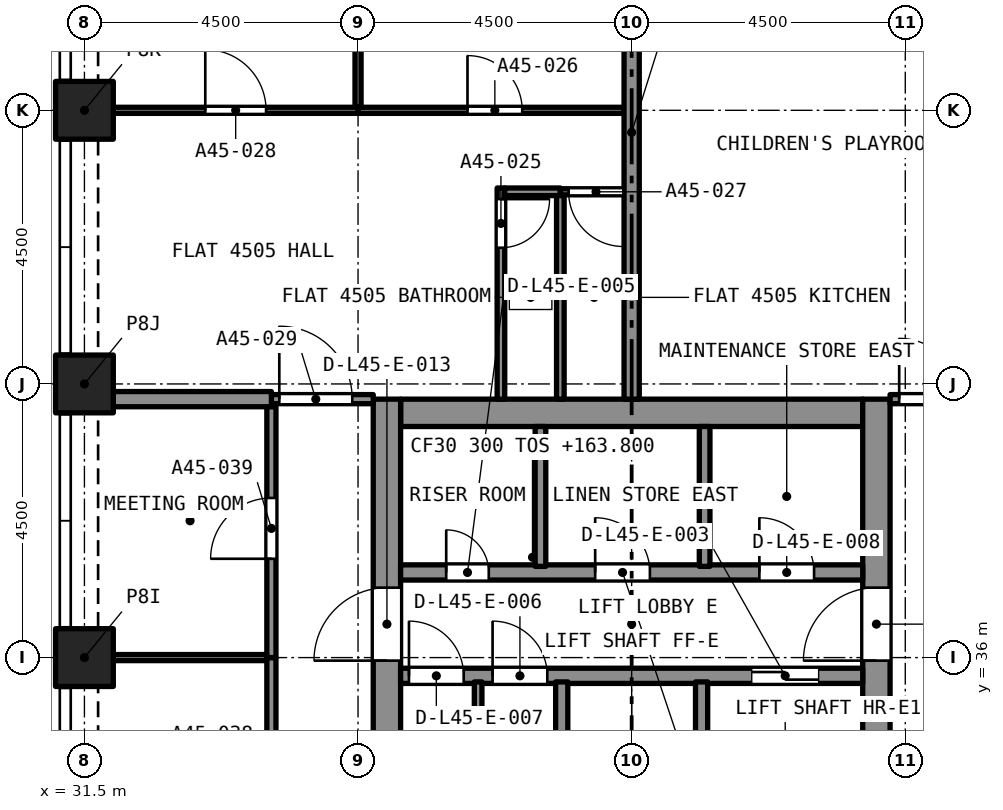
"""IFC4 building model, lengths in metres.
Left out: names, types, materials, properties, quantities, classifications, styles, units other than length and angle.
Written with IfcOpenShell. Run it as: python <this file> out.ifc"""

import sys

from ifc_helpers import new_model, si_unit, direction, frame, frame_2d, origin, origin_2d, place, context, subcontext, project, spatial, rectangle, extrude, element, fill, save


model = new_model("IFC4")
c1 = context("Model", 3, precision=1e-05, world=origin(), true_north=direction((0.0, 1.0)))
c2 = subcontext(c1, "Body", "Model", "MODEL_VIEW")
j1 = project(units=[si_unit("LENGTHUNIT", "METRE"), si_unit("PLANEANGLEUNIT", "RADIAN")], contexts=[c1])
p1 = place(None, origin())
s1 = spatial("IfcSite", under=j1, at=p1, CompositionType="ELEMENT")
p2 = place(p1, origin())
s2 = spatial("IfcBuilding", under=s1, at=p2, CompositionType="ELEMENT")
p3 = place(p2, frame((0.0, 0.0, 163.8)))
s3 = spatial("IfcBuildingStorey", under=s2, at=p3, CompositionType="ELEMENT", Elevation=163.8)
for number, where, z_axis, x_axis in (
    (1, (31.5, 36.0, 0.0), (0.0, 0.0, 1.0), (1.0, 0.0, 0.0)),
    (2, (31.5, 40.5, 0.0), (0.0, 0.0, 1.0), (1.0, 0.0, 0.0)),
    (3, (31.5, 45.0, 0.0), (0.0, 0.0, 1.0), (1.0, 0.0, 0.0)),
):
    element("IfcColumn", number, at=place(p3, frame(where, z_axis=z_axis, x_axis=x_axis)), inside=s3, PredefinedType="COLUMN", context=c2, shape_type="SweptSolid", body=[
        extrude(rectangle(XDim=0.95, YDim=0.95, at=origin_2d()), origin(), (0.0, 0.0, 1.0), 4.4),
    ])
p4 = place(p3, frame((36.7, 40.025, 0.0), z_axis=(0.0, 0.0, 1.0), x_axis=(1.0, 0.0, 0.0)))
e4 = element("IfcWall", 4, at=p4, inside=s3, PredefinedType="SOLIDWALL", context=c2, shape_type="SweptSolid", body=[
    extrude(rectangle(XDim=7.6, YDim=0.45, at=frame_2d((3.8, 0.0))), origin(), (0.0, 0.0, 1.0), 4.4),
])
p5 = place(p3, frame((36.475, 27.25, 0.0), z_axis=(0.0, 0.0, 1.0), x_axis=(0.0, 1.0, 0.0)))
e5 = element("IfcWall", 5, at=p5, inside=s3, PredefinedType="SOLIDWALL", context=c2, shape_type="SweptSolid", body=[
    extrude(rectangle(XDim=13.0, YDim=0.45, at=frame_2d((6.5, 0.0))), origin(), (0.0, 0.0, 1.0), 4.4),
])
p6 = place(p5, frame((8.7, 0.0, 0.0)))
e6 = element("IfcOpeningElement", 6, at=p6, cuts=e5, PredefinedType="OPENING", context=c2, shape_type="SweptSolid", body=[
    extrude(rectangle(XDim=1.2, YDim=2.1, at=frame_2d((0.6, 1.05))), frame((0.0, 0.235, 0.0), z_axis=(0.0, -1.0, 0.0), x_axis=(1.0, 0.0, 0.0)), (0.0, 0.0, 1.0), 0.47),
])
p7 = place(p3, frame((44.525, 27.25, 0.0), z_axis=(0.0, 0.0, 1.0), x_axis=(0.0, 1.0, 0.0)))
e7 = element("IfcWall", 7, at=p7, inside=s3, PredefinedType="SOLIDWALL", context=c2, shape_type="SweptSolid", body=[
    extrude(rectangle(XDim=13.0, YDim=0.45, at=frame_2d((6.5, 0.0))), origin(), (0.0, 0.0, 1.0), 4.4),
])
p8 = place(p7, frame((8.7, 0.0, 0.0)))
e8 = element("IfcOpeningElement", 8, at=p8, cuts=e7, PredefinedType="OPENING", context=c2, shape_type="SweptSolid", body=[
    extrude(rectangle(XDim=1.2, YDim=2.1, at=frame_2d((0.6, 1.05))), frame((0.0, 0.235, 0.0), z_axis=(0.0, -1.0, 0.0), x_axis=(1.0, 0.0, 0.0)), (0.0, 0.0, 1.0), 0.47),
])
p9 = place(p3, frame((38.35, 43.722, 0.0), z_axis=(0.0, 0.0, 1.0), x_axis=(0.0, -1.0, 0.0)))
e9 = element("IfcWall", 9, at=p9, inside=s3, PredefinedType="PARTITIONING", context=c2, shape_type="SweptSolid", body=[
    extrude(rectangle(XDim=3.472, YDim=0.125, at=frame_2d((1.736, 0.0))), origin(), (0.0, 0.0, 1.0), 4.1),
])
p10 = place(p9, frame((0.183, 0.0, 0.0)))
e10 = element("IfcOpeningElement", 10, at=p10, cuts=e9, PredefinedType="OPENING", context=c2, shape_type="SweptSolid", body=[
    extrude(rectangle(XDim=0.8, YDim=2.1, at=frame_2d((0.4, 1.05))), frame((0.0, 0.073, 0.0), z_axis=(0.0, -1.0, 0.0), x_axis=(1.0, 0.0, 0.0)), (0.0, 0.0, 1.0), 0.145),
])
p11 = place(p3, frame((38.413, 43.66, 0.0), z_axis=(0.0, 0.0, 1.0), x_axis=(1.0, 0.0, 0.0)))
e11 = element("IfcWall", 11, at=p11, inside=s3, PredefinedType="PARTITIONING", context=c2, shape_type="SweptSolid", body=[
    extrude(rectangle(XDim=0.915, YDim=0.125, at=frame_2d((0.458, 0.0))), origin(), (0.0, 0.0, 1.0), 4.1),
])
p12 = place(p3, frame((39.327, 40.25, 0.0), z_axis=(0.0, 0.0, 1.0), x_axis=(0.0, 1.0, 0.0)))
e12 = element("IfcWall", 12, at=p12, inside=s3, PredefinedType="PARTITIONING", context=c2, shape_type="SweptSolid", body=[
    extrude(rectangle(XDim=3.347, YDim=0.125, at=frame_2d((1.674, 0.0))), origin(), (0.0, 0.0, 1.0), 4.1),
])
p13 = place(p3, frame((36.0, 45.0, 0.0), z_axis=(0.0, 0.0, 1.0), x_axis=(1.0, 0.0, 0.0)))
e13 = element("IfcWall", 13, at=p13, inside=s3, PredefinedType="PARTITIONING", context=c2, shape_type="SweptSolid", body=[
    extrude(rectangle(XDim=4.375, YDim=0.1, at=frame_2d((2.188, 0.0))), origin(), (0.0, 0.0, 1.0), 4.1),
])
p14 = place(p13, frame((1.8, 0.0, 0.0)))
e14 = element("IfcOpeningElement", 14, at=p14, cuts=e13, PredefinedType="OPENING", context=c2, shape_type="SweptSolid", body=[
    extrude(rectangle(XDim=0.9, YDim=2.1, at=frame_2d((0.45, 1.05))), frame((0.0, 0.06, 0.0), z_axis=(0.0, -1.0, 0.0), x_axis=(1.0, 0.0, 0.0)), (0.0, 0.0, 1.0), 0.12),
])
p15 = place(p3, frame((36.0, 45.05, 0.0), z_axis=(0.0, 0.0, 1.0), x_axis=(0.0, 1.0, 0.0)))
e15 = element("IfcWall", 15, at=p15, inside=s3, PredefinedType="PARTITIONING", context=c2, shape_type="SweptSolid", body=[
    extrude(rectangle(XDim=3.975, YDim=0.1, at=frame_2d((1.987, 0.0))), origin(), (0.0, 0.0, 1.0), 4.1),
])
p16 = place(p3, frame((40.375, 43.66, 0.0), z_axis=(0.0, 0.0, 1.0), x_axis=(-1.0, 0.0, 0.0)))
e16 = element("IfcWall", 16, at=p16, inside=s3, PredefinedType="PARTITIONING", context=c2, shape_type="SweptSolid", body=[
    extrude(rectangle(XDim=1.048, YDim=0.1, at=frame_2d((0.524, 0.0))), origin(), (0.0, 0.0, 1.0), 4.1),
])
p17 = place(p16, frame((0.011, 0.0, 0.0)))
e17 = element("IfcOpeningElement", 17, at=p17, cuts=e16, PredefinedType="OPENING", context=c2, shape_type="SweptSolid", body=[
    extrude(rectangle(XDim=0.9, YDim=2.1, at=frame_2d((0.45, 1.05))), frame((0.0, 0.06, 0.0), z_axis=(0.0, -1.0, 0.0), x_axis=(1.0, 0.0, 0.0)), (0.0, 0.0, 1.0), 0.12),
])
p18 = place(p3, frame((31.975, 45.0, 0.0), z_axis=(0.0, 0.0, 1.0), x_axis=(1.0, 0.0, 0.0)))
e18 = element("IfcWall", 18, at=p18, inside=s3, PredefinedType="PARTITIONING", context=c2, shape_type="SweptSolid", body=[
    extrude(rectangle(XDim=4.025, YDim=0.1, at=frame_2d((2.012, 0.0))), origin(), (0.0, 0.0, 1.0), 4.1),
])
p19 = place(p18, frame((1.512, 0.0, 0.0)))
e19 = element("IfcOpeningElement", 19, at=p19, cuts=e18, PredefinedType="OPENING", context=c2, shape_type="SweptSolid", body=[
    extrude(rectangle(XDim=1.0, YDim=2.1, at=frame_2d((0.5, 1.05))), frame((0.0, 0.06, 0.0), z_axis=(0.0, -1.0, 0.0), x_axis=(1.0, 0.0, 0.0)), (0.0, 0.0, 1.0), 0.12),
])
p20 = place(p3, frame((34.575, 40.25, 0.0), z_axis=(0.0, 0.0, 1.0), x_axis=(1.0, 0.0, 0.0)))
e20 = element("IfcWall", 20, at=p20, inside=s3, PredefinedType="PARTITIONING", context=c2, shape_type="SweptSolid", body=[
    extrude(rectangle(XDim=1.675, YDim=0.15, at=frame_2d((0.837, 0.0))), origin(), (0.0, 0.0, 1.0), 4.1),
])
p21 = place(p20, frame((0.13, 0.0, 0.0)))
e21 = element("IfcOpeningElement", 21, at=p21, cuts=e20, PredefinedType="OPENING", context=c2, shape_type="SweptSolid", body=[
    extrude(rectangle(XDim=1.2, YDim=2.4, at=frame_2d((0.6, 1.2))), frame((0.0, 0.085, 0.0), z_axis=(0.0, -1.0, 0.0), x_axis=(1.0, 0.0, 0.0)), (0.0, 0.0, 1.0), 0.17),
])
p22 = place(p3, frame((31.975, 40.25, 0.0), z_axis=(0.0, 0.0, 1.0), x_axis=(1.0, 0.0, 0.0)))
e22 = element("IfcWall", 22, at=p22, inside=s3, PredefinedType="PARTITIONING", context=c2, shape_type="SweptSolid", body=[
    extrude(rectangle(XDim=2.6, YDim=0.25, at=frame_2d((1.3, 0.0))), origin(), (0.0, 0.0, 1.0), 4.1),
])
p23 = place(p3, frame((40.5, 40.25, 0.0), z_axis=(0.0, 0.0, 1.0), x_axis=(0.0, 1.0, 0.0)))
e23 = element("IfcWall", 23, at=p23, inside=s3, PredefinedType="PARTITIONING", context=c2, shape_type="SweptSolid", body=[
    extrude(rectangle(XDim=8.775, YDim=0.25, at=frame_2d((4.387, 0.0))), origin(), (0.0, 0.0, 1.0), 4.1),
])
p24 = place(p3, frame((44.75, 40.25, 0.0), z_axis=(0.0, 0.0, 1.0), x_axis=(1.0, 0.0, 0.0)))
e24 = element("IfcWall", 24, at=p24, inside=s3, PredefinedType="PARTITIONING", context=c2, shape_type="SweptSolid", body=[
    extrude(rectangle(XDim=1.2, YDim=0.15, at=frame_2d((0.6, 0.0))), origin(), (0.0, 0.0, 1.0), 4.1),
])
p25 = place(p24, frame((0.15, 0.0, 0.0)))
e25 = element("IfcOpeningElement", 25, at=p25, cuts=e24, PredefinedType="OPENING", context=c2, shape_type="SweptSolid", body=[
    extrude(rectangle(XDim=1.0, YDim=2.1, at=frame_2d((0.5, 1.05))), frame((0.0, 0.085, 0.0), z_axis=(0.0, -1.0, 0.0), x_axis=(1.0, 0.0, 0.0)), (0.0, 0.0, 1.0), 0.17),
])
p26 = place(p3, frame((34.575, 31.5, 0.0), z_axis=(0.0, 0.0, 1.0), x_axis=(0.0, 1.0, 0.0)))
e26 = element("IfcWall", 26, at=p26, inside=s3, PredefinedType="PARTITIONING", context=c2, shape_type="SweptSolid", body=[
    extrude(rectangle(XDim=4.5, YDim=0.15, at=frame_2d((2.25, 0.0))), origin(), (0.0, 0.0, 1.0), 4.1),
])
p27 = place(p26, frame((1.75, 0.0, 0.0)))
e27 = element("IfcOpeningElement", 27, at=p27, cuts=e26, PredefinedType="OPENING", context=c2, shape_type="SweptSolid", body=[
    extrude(rectangle(XDim=1.0, YDim=2.1, at=frame_2d((0.5, 1.05))), frame((0.0, 0.085, 0.0), z_axis=(0.0, -1.0, 0.0), x_axis=(1.0, 0.0, 0.0)), (0.0, 0.0, 1.0), 0.17),
])
p28 = place(p3, frame((34.575, 36.0, 0.0), z_axis=(0.0, 0.0, 1.0), x_axis=(0.0, 1.0, 0.0)))
e28 = element("IfcWall", 28, at=p28, inside=s3, PredefinedType="PARTITIONING", context=c2, shape_type="SweptSolid", body=[
    extrude(rectangle(XDim=4.125, YDim=0.15, at=frame_2d((2.062, 0.0))), origin(), (0.0, 0.0, 1.0), 4.1),
])
p29 = place(p28, frame((1.625, 0.0, 0.0)))
e29 = element("IfcOpeningElement", 29, at=p29, cuts=e28, PredefinedType="OPENING", context=c2, shape_type="SweptSolid", body=[
    extrude(rectangle(XDim=1.0, YDim=2.1, at=frame_2d((0.5, 1.05))), frame((0.0, 0.085, 0.0), z_axis=(0.0, -1.0, 0.0), x_axis=(1.0, 0.0, 0.0)), (0.0, 0.0, 1.0), 0.17),
])
p30 = place(p3, frame((31.975, 36.0, 0.0), z_axis=(0.0, 0.0, 1.0), x_axis=(1.0, 0.0, 0.0)))
e30 = element("IfcWall", 30, at=p30, inside=s3, PredefinedType="PARTITIONING", context=c2, shape_type="SweptSolid", body=[
    extrude(rectangle(XDim=2.525, YDim=0.1, at=frame_2d((1.262, 0.0))), origin(), (0.0, 0.0, 1.0), 4.1),
])
p31 = place(p3, frame((36.7, 35.7, 0.0), z_axis=(0.0, 0.0, 1.0), x_axis=(1.0, 0.0, 0.0)))
e31 = element("IfcWall", 31, at=p31, inside=s3, PredefinedType="SOLIDWALL", context=c2, shape_type="SweptSolid", body=[
    extrude(rectangle(XDim=7.6, YDim=0.25, at=frame_2d((3.8, 0.0))), origin(), (0.0, 0.0, 1.0), 4.1),
])
p32 = place(p31, frame((5.775, 0.0, 0.0)))
e32 = element("IfcOpeningElement", 32, at=p32, cuts=e31, PredefinedType="OPENING", context=c2, shape_type="SweptSolid", body=[
    extrude(rectangle(XDim=1.1, YDim=2.4, at=frame_2d((0.55, 1.2))), frame((0.0, 0.135, 0.0), z_axis=(0.0, -1.0, 0.0), x_axis=(1.0, 0.0, 0.0)), (0.0, 0.0, 1.0), 0.27),
])
p33 = place(p31, frame((1.512, 0.0, 0.0)))
e33 = element("IfcOpeningElement", 33, at=p33, cuts=e31, PredefinedType="OPENING", context=c2, shape_type="SweptSolid", body=[
    extrude(rectangle(XDim=0.9, YDim=2.1, at=frame_2d((0.45, 1.05))), frame((0.0, 0.135, 0.0), z_axis=(0.0, -1.0, 0.0), x_axis=(1.0, 0.0, 0.0)), (0.0, 0.0, 1.0), 0.27),
])
p34 = place(p31, frame((0.137, 0.0, 0.0)))
e34 = element("IfcOpeningElement", 34, at=p34, cuts=e31, PredefinedType="OPENING", context=c2, shape_type="SweptSolid", body=[
    extrude(rectangle(XDim=0.9, YDim=2.1, at=frame_2d((0.45, 1.05))), frame((0.0, 0.135, 0.0), z_axis=(0.0, -1.0, 0.0), x_axis=(1.0, 0.0, 0.0)), (0.0, 0.0, 1.0), 0.27),
])
p35 = place(p3, frame((36.7, 37.4, 0.0), z_axis=(0.0, 0.0, 1.0), x_axis=(1.0, 0.0, 0.0)))
e35 = element("IfcWall", 35, at=p35, inside=s3, PredefinedType="SOLIDWALL", context=c2, shape_type="SweptSolid", body=[
    extrude(rectangle(XDim=7.6, YDim=0.25, at=frame_2d((3.8, 0.0))), origin(), (0.0, 0.0, 1.0), 4.1),
])
p36 = place(p35, frame((0.75, 0.0, 0.0)))
e36 = element("IfcOpeningElement", 36, at=p36, cuts=e35, PredefinedType="OPENING", context=c2, shape_type="SweptSolid", body=[
    extrude(rectangle(XDim=0.7, YDim=2.1, at=frame_2d((0.35, 1.05))), frame((0.0, 0.135, 0.0), z_axis=(0.0, -1.0, 0.0), x_axis=(1.0, 0.0, 0.0)), (0.0, 0.0, 1.0), 0.27),
])
p37 = place(p35, frame((5.9, 0.0, 0.0)))
e37 = element("IfcOpeningElement", 37, at=p37, cuts=e35, PredefinedType="OPENING", context=c2, shape_type="SweptSolid", body=[
    extrude(rectangle(XDim=0.9, YDim=2.1, at=frame_2d((0.45, 1.05))), frame((0.0, 0.135, 0.0), z_axis=(0.0, -1.0, 0.0), x_axis=(1.0, 0.0, 0.0)), (0.0, 0.0, 1.0), 0.27),
])
p38 = place(p35, frame((3.2, 0.0, 0.0)))
e38 = element("IfcOpeningElement", 38, at=p38, cuts=e35, PredefinedType="OPENING", context=c2, shape_type="SweptSolid", body=[
    extrude(rectangle(XDim=0.9, YDim=2.1, at=frame_2d((0.45, 1.05))), frame((0.0, 0.135, 0.0), z_axis=(0.0, -1.0, 0.0), x_axis=(1.0, 0.0, 0.0)), (0.0, 0.0, 1.0), 0.27),
])
for number, where, z_axis, x_axis in (
    (39, (41.65, 33.3, 0.0), (0.0, 0.0, 1.0), (0.0, 1.0, 0.0)),
    (40, (39.35, 33.3, 0.0), (0.0, 0.0, 1.0), (0.0, 1.0, 0.0)),
):
    element("IfcWall", number, at=place(p3, frame(where, z_axis=z_axis, x_axis=x_axis)), inside=s3, PredefinedType="SOLIDWALL", context=c2, shape_type="SweptSolid", body=[
        extrude(rectangle(XDim=2.3, YDim=0.2, at=frame_2d((1.15, 0.0))), origin(), (0.0, 0.0, 1.0), 4.1),
    ])
for number, where, z_axis, x_axis in (
    (41, (41.7, 37.5, 0.0), (0.0, 0.0, 1.0), (0.0, 1.0, 0.0)),
    (42, (39.0, 37.5, 0.0), (0.0, 0.0, 1.0), (0.0, 1.0, 0.0)),
):
    element("IfcWall", number, at=place(p3, frame(where, z_axis=z_axis, x_axis=x_axis)), inside=s3, PredefinedType="SOLIDWALL", context=c2, shape_type="SweptSolid", body=[
        extrude(rectangle(XDim=2.3, YDim=0.175, at=frame_2d((1.15, 0.0))), origin(), (0.0, 0.0, 1.0), 4.1),
    ])
p39 = place(p3, frame((37.975, 33.3, 0.0), z_axis=(0.0, 0.0, 1.0), x_axis=(0.0, 1.0, 0.0)))
e43 = element("IfcWall", 43, at=p39, inside=s3, PredefinedType="PARTITIONING", context=c2, shape_type="SweptSolid", body=[
    extrude(rectangle(XDim=2.3, YDim=0.125, at=frame_2d((1.15, 0.0))), origin(), (0.0, 0.0, 1.0), 4.1),
])
p40 = place(p10, origin())
e44 = element("IfcDoor", 44, at=p40, inside=s3, OperationType="SINGLE_SWING_LEFT", PredefinedType="DOOR", context=c2, shape_type="SweptSolid", body=[
    extrude(rectangle(XDim=0.8, YDim=2.1, at=frame_2d((0.4, 1.05))), frame((0.0, 0.025, 0.0), z_axis=(0.0, -1.0, 0.0), x_axis=(1.0, 0.0, 0.0)), (0.0, 0.0, 1.0), 0.05),
])
fill(e10, e44)
p41 = place(p14, origin())
e45 = element("IfcDoor", 45, at=p41, inside=s3, OperationType="SINGLE_SWING_RIGHT", PredefinedType="DOOR", context=c2, shape_type="SweptSolid", body=[
    extrude(rectangle(XDim=0.9, YDim=2.1, at=frame_2d((0.45, 1.05))), frame((0.0, 0.025, 0.0), z_axis=(0.0, -1.0, 0.0), x_axis=(1.0, 0.0, 0.0)), (0.0, 0.0, 1.0), 0.05),
])
fill(e14, e45)
p42 = place(p17, origin())
e46 = element("IfcDoor", 46, at=p42, inside=s3, OperationType="SINGLE_SWING_LEFT", PredefinedType="DOOR", context=c2, shape_type="SweptSolid", body=[
    extrude(rectangle(XDim=0.9, YDim=2.1, at=frame_2d((0.45, 1.05))), frame((0.0, 0.025, 0.0), z_axis=(0.0, -1.0, 0.0), x_axis=(1.0, 0.0, 0.0)), (0.0, 0.0, 1.0), 0.05),
])
fill(e17, e46)
p43 = place(p19, origin())
e47 = element("IfcDoor", 47, at=p43, inside=s3, OperationType="SINGLE_SWING_LEFT", PredefinedType="DOOR", context=c2, shape_type="SweptSolid", body=[
    extrude(rectangle(XDim=1.0, YDim=2.1, at=frame_2d((0.5, 1.05))), frame((0.0, 0.025, 0.0), z_axis=(0.0, -1.0, 0.0), x_axis=(1.0, 0.0, 0.0)), (0.0, 0.0, 1.0), 0.05),
])
fill(e19, e47)
p44 = place(p21, origin())
e48 = element("IfcDoor", 48, at=p44, inside=s3, OperationType="SINGLE_SWING_LEFT", PredefinedType="DOOR", context=c2, shape_type="SweptSolid", body=[
    extrude(rectangle(XDim=1.2, YDim=2.4, at=frame_2d((0.6, 1.2))), frame((0.0, 0.025, 0.0), z_axis=(0.0, -1.0, 0.0), x_axis=(1.0, 0.0, 0.0)), (0.0, 0.0, 1.0), 0.05),
])
fill(e21, e48)
p45 = place(p25, origin())
e49 = element("IfcDoor", 49, at=p45, inside=s3, OperationType="SINGLE_SWING_RIGHT", PredefinedType="DOOR", context=c2, shape_type="SweptSolid", body=[
    extrude(rectangle(XDim=1.0, YDim=2.1, at=frame_2d((0.5, 1.05))), frame((0.0, 0.025, 0.0), z_axis=(0.0, -1.0, 0.0), x_axis=(1.0, 0.0, 0.0)), (0.0, 0.0, 1.0), 0.05),
])
fill(e25, e49)
p46 = place(p29, origin())
e50 = element("IfcDoor", 50, at=p46, inside=s3, OperationType="SINGLE_SWING_RIGHT", PredefinedType="DOOR", context=c2, shape_type="SweptSolid", body=[
    extrude(rectangle(XDim=1.0, YDim=2.1, at=frame_2d((0.5, 1.05))), frame((0.0, 0.025, 0.0), z_axis=(0.0, -1.0, 0.0), x_axis=(1.0, 0.0, 0.0)), (0.0, 0.0, 1.0), 0.05),
])
fill(e29, e50)
p47 = place(p32, origin())
e51 = element("IfcDoor", 51, at=p47, inside=s3, OperationType="SLIDING_TO_LEFT", PredefinedType="DOOR", context=c2, shape_type="SweptSolid", body=[
    extrude(rectangle(XDim=1.1, YDim=2.4, at=frame_2d((0.55, 1.2))), frame((0.0, 0.025, 0.0), z_axis=(0.0, -1.0, 0.0), x_axis=(1.0, 0.0, 0.0)), (0.0, 0.0, 1.0), 0.05),
])
fill(e32, e51)
p48 = place(p36, origin())
e52 = element("IfcDoor", 52, at=p48, inside=s3, OperationType="SINGLE_SWING_LEFT", PredefinedType="DOOR", context=c2, shape_type="SweptSolid", body=[
    extrude(rectangle(XDim=0.7, YDim=2.1, at=frame_2d((0.35, 1.05))), frame((0.0, 0.025, 0.0), z_axis=(0.0, -1.0, 0.0), x_axis=(1.0, 0.0, 0.0)), (0.0, 0.0, 1.0), 0.05),
])
fill(e36, e52)
p49 = place(p33, origin())
e53 = element("IfcDoor", 53, at=p49, inside=s3, OperationType="SINGLE_SWING_LEFT", PredefinedType="DOOR", context=c2, shape_type="SweptSolid", body=[
    extrude(rectangle(XDim=0.9, YDim=2.1, at=frame_2d((0.45, 1.05))), frame((0.0, 0.025, 0.0), z_axis=(0.0, -1.0, 0.0), x_axis=(1.0, 0.0, 0.0)), (0.0, 0.0, 1.0), 0.05),
])
fill(e33, e53)
p50 = place(p34, origin())
e54 = element("IfcDoor", 54, at=p50, inside=s3, OperationType="SINGLE_SWING_LEFT", PredefinedType="DOOR", context=c2, shape_type="SweptSolid", body=[
    extrude(rectangle(XDim=0.9, YDim=2.1, at=frame_2d((0.45, 1.05))), frame((0.0, 0.025, 0.0), z_axis=(0.0, -1.0, 0.0), x_axis=(1.0, 0.0, 0.0)), (0.0, 0.0, 1.0), 0.05),
])
fill(e34, e54)
p51 = place(p37, origin())
e55 = element("IfcDoor", 55, at=p51, inside=s3, OperationType="SINGLE_SWING_LEFT", PredefinedType="DOOR", context=c2, shape_type="SweptSolid", body=[
    extrude(rectangle(XDim=0.9, YDim=2.1, at=frame_2d((0.45, 1.05))), frame((0.0, 0.025, 0.0), z_axis=(0.0, -1.0, 0.0), x_axis=(1.0, 0.0, 0.0)), (0.0, 0.0, 1.0), 0.05),
])
fill(e37, e55)
p52 = place(p38, origin())
e56 = element("IfcDoor", 56, at=p52, inside=s3, OperationType="SINGLE_SWING_LEFT", PredefinedType="DOOR", context=c2, shape_type="SweptSolid", body=[
    extrude(rectangle(XDim=0.9, YDim=2.1, at=frame_2d((0.45, 1.05))), frame((0.0, 0.025, 0.0), z_axis=(0.0, -1.0, 0.0), x_axis=(1.0, 0.0, 0.0)), (0.0, 0.0, 1.0), 0.05),
])
fill(e38, e56)
p53 = place(p6, origin())
e57 = element("IfcDoor", 57, at=p53, inside=s3, OperationType="SINGLE_SWING_LEFT", PredefinedType="DOOR", context=c2, shape_type="SweptSolid", body=[
    extrude(rectangle(XDim=1.2, YDim=2.1, at=frame_2d((0.6, 1.05))), frame((0.0, 0.025, 0.0), z_axis=(0.0, -1.0, 0.0), x_axis=(1.0, 0.0, 0.0)), (0.0, 0.0, 1.0), 0.05),
])
fill(e6, e57)
p54 = place(p8, origin())
e58 = element("IfcDoor", 58, at=p54, inside=s3, OperationType="SINGLE_SWING_LEFT", PredefinedType="DOOR", context=c2, shape_type="SweptSolid", body=[
    extrude(rectangle(XDim=1.2, YDim=2.1, at=frame_2d((0.6, 1.05))), frame((0.0, 0.025, 0.0), z_axis=(0.0, -1.0, 0.0), x_axis=(1.0, 0.0, 0.0)), (0.0, 0.0, 1.0), 0.05),
])
fill(e8, e58)
save(model, sys.argv[1])
